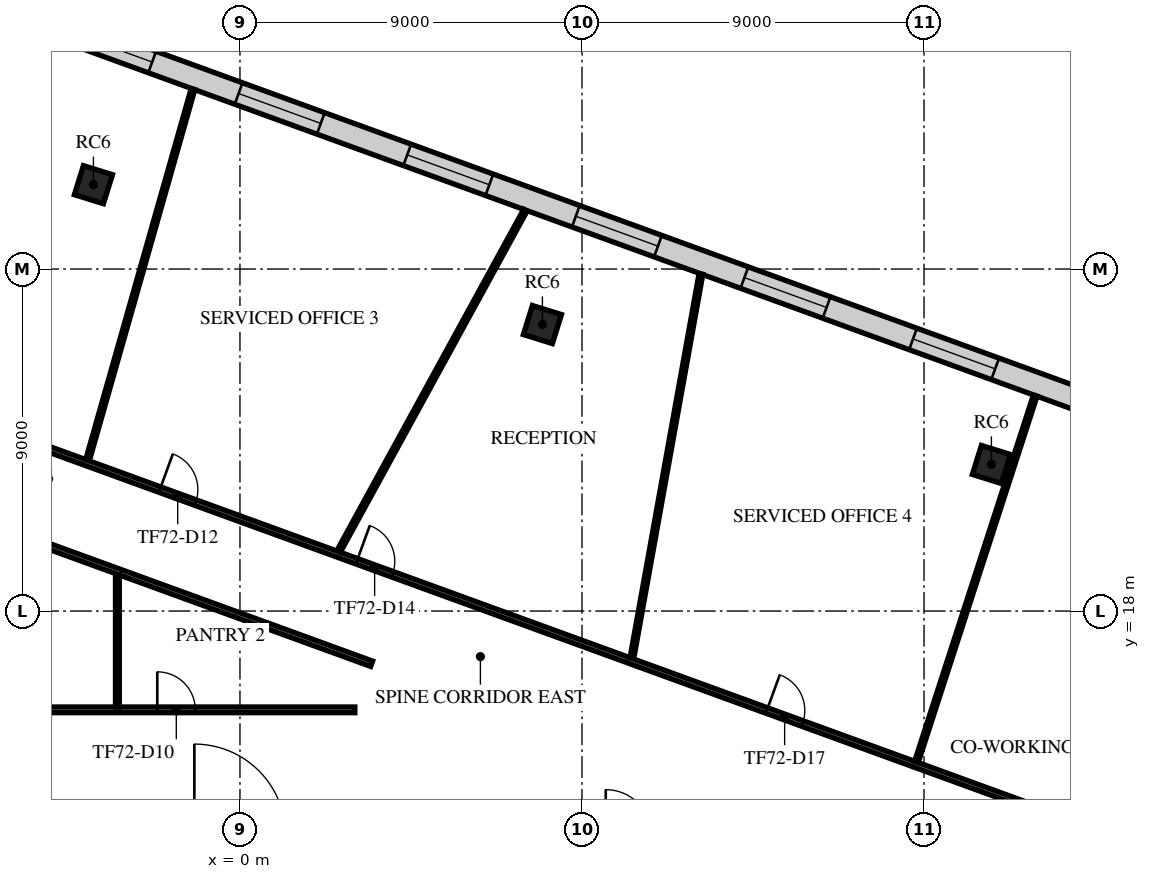
"""IFC4 building model, lengths in metres.
Left out: names, types, materials, properties, quantities, classifications, styles, units other than length and angle.
Written with IfcOpenShell. Run it as: python <this file> out.ifc"""

import sys

from ifc_helpers import new_model, si_unit, direction, frame, frame_2d, origin, origin_2d, place, context, subcontext, project, spatial, rectangle, extrude, element, fill, save


model = new_model("IFC4")
c1 = context("Model", 3, precision=1e-05, world=origin(), true_north=direction((0.0, 1.0)))
c2 = subcontext(c1, "Body", "Model", "MODEL_VIEW")
j1 = project(units=[si_unit("LENGTHUNIT", "METRE"), si_unit("PLANEANGLEUNIT", "RADIAN")], contexts=[c1])
p1 = place(None, origin())
s1 = spatial("IfcSite", under=j1, at=p1, CompositionType="ELEMENT")
p2 = place(p1, origin())
s2 = spatial("IfcBuilding", under=s1, at=p2, CompositionType="ELEMENT")
p3 = place(p2, frame((0.0, 0.0, 304.5)))
s3 = spatial("IfcBuildingStorey", under=s2, at=p3, CompositionType="ELEMENT", Elevation=304.5)
for number, where, z_axis, x_axis in (
    (1, (19.773, 21.857, 0.0), (0.0, 0.0, 1.0), (0.298, 0.955, 0.0)),
    (2, (7.958, 25.539, 0.0), (0.0, 0.0, 1.0), (0.298, 0.955, 0.0)),
    (3, (-3.856, 29.22, 0.0), (0.0, 0.0, 1.0), (0.298, 0.955, 0.0)),
):
    element("IfcColumn", number, at=place(p3, frame(where, z_axis=z_axis, x_axis=x_axis)), inside=s3, PredefinedType="COLUMN", context=c2, shape_type="SweptSolid", body=[
        extrude(rectangle(XDim=0.8, YDim=0.8, at=origin_2d()), origin(), (0.0, 0.0, 1.0), 4.0),
    ])
p4 = place(p3, frame((16.885, -31.675, 0.0), z_axis=(0.0, 0.0, 1.0), x_axis=(0.342016786282, 0.939693842643, 0.0)))
e4 = element("IfcWall", 4, at=p4, inside=s3, PredefinedType="STANDARD", context=c2, shape_type="SweptSolid", body=[
    extrude(rectangle(XDim=47.979, YDim=0.6, at=frame_2d((23.99, 0.0))), origin(), (0.0, 0.0, 1.0), 3.65),
])
p5 = place(p4, frame((1.231, 0.0, 0.9)))
e5 = element("IfcOpeningElement", 5, at=p5, cuts=e4, PredefinedType="OPENING", context=c2, shape_type="SweptSolid", body=[
    extrude(rectangle(XDim=1.9, YDim=2.1, at=frame_2d((0.95, 1.05))), frame((0.0, 0.31, 0.0), z_axis=(0.0, -1.0, 0.0), x_axis=(1.0, 0.0, 0.0)), (0.0, 0.0, 1.0), 0.62),
])
p6 = place(p4, frame((5.593, 0.0, 0.9)))
e6 = element("IfcOpeningElement", 6, at=p6, cuts=e4, PredefinedType="OPENING", context=c2, shape_type="SweptSolid", body=[
    extrude(rectangle(XDim=1.9, YDim=2.1, at=frame_2d((0.95, 1.05))), frame((0.0, 0.31, 0.0), z_axis=(0.0, -1.0, 0.0), x_axis=(1.0, 0.0, 0.0)), (0.0, 0.0, 1.0), 0.62),
])
p7 = place(p4, frame((9.954, 0.0, 0.9)))
e7 = element("IfcOpeningElement", 7, at=p7, cuts=e4, PredefinedType="OPENING", context=c2, shape_type="SweptSolid", body=[
    extrude(rectangle(XDim=1.9, YDim=2.1, at=frame_2d((0.95, 1.05))), frame((0.0, 0.31, 0.0), z_axis=(0.0, -1.0, 0.0), x_axis=(1.0, 0.0, 0.0)), (0.0, 0.0, 1.0), 0.62),
])
p8 = place(p4, frame((14.316, 0.0, 0.9)))
e8 = element("IfcOpeningElement", 8, at=p8, cuts=e4, PredefinedType="OPENING", context=c2, shape_type="SweptSolid", body=[
    extrude(rectangle(XDim=1.9, YDim=2.1, at=frame_2d((0.95, 1.05))), frame((0.0, 0.31, 0.0), z_axis=(0.0, -1.0, 0.0), x_axis=(1.0, 0.0, 0.0)), (0.0, 0.0, 1.0), 0.62),
])
p9 = place(p4, frame((18.678, 0.0, 0.9)))
e9 = element("IfcOpeningElement", 9, at=p9, cuts=e4, PredefinedType="OPENING", context=c2, shape_type="SweptSolid", body=[
    extrude(rectangle(XDim=1.9, YDim=2.1, at=frame_2d((0.95, 1.05))), frame((0.0, 0.31, 0.0), z_axis=(0.0, -1.0, 0.0), x_axis=(1.0, 0.0, 0.0)), (0.0, 0.0, 1.0), 0.62),
])
p10 = place(p4, frame((23.04, 0.0, 0.9)))
e10 = element("IfcOpeningElement", 10, at=p10, cuts=e4, PredefinedType="OPENING", context=c2, shape_type="SweptSolid", body=[
    extrude(rectangle(XDim=1.9, YDim=2.1, at=frame_2d((0.95, 1.05))), frame((0.0, 0.31, 0.0), z_axis=(0.0, -1.0, 0.0), x_axis=(1.0, 0.0, 0.0)), (0.0, 0.0, 1.0), 0.62),
])
p11 = place(p4, frame((27.401, 0.0, 0.9)))
e11 = element("IfcOpeningElement", 11, at=p11, cuts=e4, PredefinedType="OPENING", context=c2, shape_type="SweptSolid", body=[
    extrude(rectangle(XDim=1.9, YDim=2.1, at=frame_2d((0.95, 1.05))), frame((0.0, 0.31, 0.0), z_axis=(0.0, -1.0, 0.0), x_axis=(1.0, 0.0, 0.0)), (0.0, 0.0, 1.0), 0.62),
])
p12 = place(p4, frame((31.763, 0.0, 0.9)))
e12 = element("IfcOpeningElement", 12, at=p12, cuts=e4, PredefinedType="OPENING", context=c2, shape_type="SweptSolid", body=[
    extrude(rectangle(XDim=1.9, YDim=2.1, at=frame_2d((0.95, 1.05))), frame((0.0, 0.31, 0.0), z_axis=(0.0, -1.0, 0.0), x_axis=(1.0, 0.0, 0.0)), (0.0, 0.0, 1.0), 0.62),
])
p13 = place(p4, frame((36.125, 0.0, 0.9)))
e13 = element("IfcOpeningElement", 13, at=p13, cuts=e4, PredefinedType="OPENING", context=c2, shape_type="SweptSolid", body=[
    extrude(rectangle(XDim=1.9, YDim=2.1, at=frame_2d((0.95, 1.05))), frame((0.0, 0.31, 0.0), z_axis=(0.0, -1.0, 0.0), x_axis=(1.0, 0.0, 0.0)), (0.0, 0.0, 1.0), 0.62),
])
p14 = place(p4, frame((40.487, 0.0, 0.9)))
e14 = element("IfcOpeningElement", 14, at=p14, cuts=e4, PredefinedType="OPENING", context=c2, shape_type="SweptSolid", body=[
    extrude(rectangle(XDim=1.9, YDim=2.1, at=frame_2d((0.95, 1.05))), frame((0.0, 0.31, 0.0), z_axis=(0.0, -1.0, 0.0), x_axis=(1.0, 0.0, 0.0)), (0.0, 0.0, 1.0), 0.62),
])
p15 = place(p4, frame((44.848, 0.0, 0.9)))
e15 = element("IfcOpeningElement", 15, at=p15, cuts=e4, PredefinedType="OPENING", context=c2, shape_type="SweptSolid", body=[
    extrude(rectangle(XDim=1.9, YDim=2.1, at=frame_2d((0.95, 1.05))), frame((0.0, 0.31, 0.0), z_axis=(0.0, -1.0, 0.0), x_axis=(1.0, 0.0, 0.0)), (0.0, 0.0, 1.0), 0.62),
])
p16 = place(p3, frame((29.882, 20.73, 0.0), z_axis=(0.0, 0.0, 1.0), x_axis=(-0.939693396491, 0.342018012087, 0.0)))
e16 = element("IfcWall", 16, at=p16, inside=s3, PredefinedType="STANDARD", context=c2, shape_type="SweptSolid", body=[
    extrude(rectangle(XDim=42.49, YDim=0.6, at=frame_2d((21.245, 0.0))), origin(), (0.0, 0.0, 1.0), 3.65),
])
p17 = place(p16, frame((1.21, 0.0, 0.9)))
e17 = element("IfcOpeningElement", 17, at=p17, cuts=e16, PredefinedType="OPENING", context=c2, shape_type="SweptSolid", body=[
    extrude(rectangle(XDim=2.3, YDim=2.1, at=frame_2d((1.15, 1.05))), frame((0.0, 0.31, 0.0), z_axis=(0.0, -1.0, 0.0), x_axis=(1.0, 0.0, 0.0)), (0.0, 0.0, 1.0), 0.62),
])
p18 = place(p16, frame((5.932, 0.0, 0.9)))
e18 = element("IfcOpeningElement", 18, at=p18, cuts=e16, PredefinedType="OPENING", context=c2, shape_type="SweptSolid", body=[
    extrude(rectangle(XDim=2.3, YDim=2.1, at=frame_2d((1.15, 1.05))), frame((0.0, 0.31, 0.0), z_axis=(0.0, -1.0, 0.0), x_axis=(1.0, 0.0, 0.0)), (0.0, 0.0, 1.0), 0.62),
])
p19 = place(p16, frame((10.653, 0.0, 0.9)))
e19 = element("IfcOpeningElement", 19, at=p19, cuts=e16, PredefinedType="OPENING", context=c2, shape_type="SweptSolid", body=[
    extrude(rectangle(XDim=2.3, YDim=2.1, at=frame_2d((1.15, 1.05))), frame((0.0, 0.31, 0.0), z_axis=(0.0, -1.0, 0.0), x_axis=(1.0, 0.0, 0.0)), (0.0, 0.0, 1.0), 0.62),
])
p20 = place(p16, frame((15.374, 0.0, 0.9)))
e20 = element("IfcOpeningElement", 20, at=p20, cuts=e16, PredefinedType="OPENING", context=c2, shape_type="SweptSolid", body=[
    extrude(rectangle(XDim=2.3, YDim=2.1, at=frame_2d((1.15, 1.05))), frame((0.0, 0.31, 0.0), z_axis=(0.0, -1.0, 0.0), x_axis=(1.0, 0.0, 0.0)), (0.0, 0.0, 1.0), 0.62),
])
p21 = place(p16, frame((20.095, 0.0, 0.9)))
e21 = element("IfcOpeningElement", 21, at=p21, cuts=e16, PredefinedType="OPENING", context=c2, shape_type="SweptSolid", body=[
    extrude(rectangle(XDim=2.3, YDim=2.1, at=frame_2d((1.15, 1.05))), frame((0.0, 0.31, 0.0), z_axis=(0.0, -1.0, 0.0), x_axis=(1.0, 0.0, 0.0)), (0.0, 0.0, 1.0), 0.62),
])
p22 = place(p16, frame((24.816, 0.0, 0.9)))
e22 = element("IfcOpeningElement", 22, at=p22, cuts=e16, PredefinedType="OPENING", context=c2, shape_type="SweptSolid", body=[
    extrude(rectangle(XDim=2.3, YDim=2.1, at=frame_2d((1.15, 1.05))), frame((0.0, 0.31, 0.0), z_axis=(0.0, -1.0, 0.0), x_axis=(1.0, 0.0, 0.0)), (0.0, 0.0, 1.0), 0.62),
])
p23 = place(p16, frame((29.537, 0.0, 0.9)))
e23 = element("IfcOpeningElement", 23, at=p23, cuts=e16, PredefinedType="OPENING", context=c2, shape_type="SweptSolid", body=[
    extrude(rectangle(XDim=2.3, YDim=2.1, at=frame_2d((1.15, 1.05))), frame((0.0, 0.31, 0.0), z_axis=(0.0, -1.0, 0.0), x_axis=(1.0, 0.0, 0.0)), (0.0, 0.0, 1.0), 0.62),
])
p24 = place(p16, frame((34.258, 0.0, 0.9)))
e24 = element("IfcOpeningElement", 24, at=p24, cuts=e16, PredefinedType="OPENING", context=c2, shape_type="SweptSolid", body=[
    extrude(rectangle(XDim=2.3, YDim=2.1, at=frame_2d((1.15, 1.05))), frame((0.0, 0.31, 0.0), z_axis=(0.0, -1.0, 0.0), x_axis=(1.0, 0.0, 0.0)), (0.0, 0.0, 1.0), 0.62),
])
p25 = place(p16, frame((38.979, 0.0, 0.9)))
e25 = element("IfcOpeningElement", 25, at=p25, cuts=e16, PredefinedType="OPENING", context=c2, shape_type="SweptSolid", body=[
    extrude(rectangle(XDim=2.3, YDim=2.1, at=frame_2d((1.15, 1.05))), frame((0.0, 0.31, 0.0), z_axis=(0.0, -1.0, 0.0), x_axis=(1.0, 0.0, 0.0)), (0.0, 0.0, 1.0), 0.62),
])
p26 = place(p3, frame((-14.25, 15.4, 0.0), z_axis=(0.0, 0.0, 1.0), x_axis=(1.0, 0.0, 0.0)))
e26 = element("IfcWall", 26, at=p26, inside=s3, PredefinedType="PARTITIONING", context=c2, shape_type="SweptSolid", body=[
    extrude(rectangle(XDim=17.273, YDim=0.15, at=frame_2d((8.637, 0.0))), origin(), (0.0, 0.0, 1.0), 3.25),
])
p27 = place(p26, frame((12.075, 0.0, 0.0)))
e27 = element("IfcOpeningElement", 27, at=p27, cuts=e26, PredefinedType="OPENING", context=c2, shape_type="SweptSolid", body=[
    extrude(rectangle(XDim=1.0, YDim=2.1, at=frame_2d((0.5, 1.05))), frame((0.0, 0.085, 0.0), z_axis=(0.0, -1.0, 0.0), x_axis=(1.0, 0.0, 0.0)), (0.0, 0.0, 1.0), 0.17),
])
p28 = place(p3, frame((-12.369, 22.376, 0.0), z_axis=(0.0, 0.0, 1.0), x_axis=(0.939694397018, -0.342015263129, 0.0)))
e28 = element("IfcWall", 28, at=p28, inside=s3, PredefinedType="PARTITIONING", context=c2, shape_type="SweptSolid", body=[
    extrude(rectangle(XDim=16.851, YDim=0.15, at=frame_2d((8.425, 0.0))), origin(), (0.0, 0.0, 1.0), 3.25),
])
p29 = place(p3, frame((-11.549, 24.631, 0.0), z_axis=(0.0, 0.0, 1.0), x_axis=(0.939685979246, -0.342038390256, 0.0)))
e29 = element("IfcWall", 29, at=p29, inside=s3, PredefinedType="PARTITIONING", context=c2, shape_type="SweptSolid", body=[
    extrude(rectangle(XDim=38.628, YDim=0.15, at=frame_2d((19.314, 0.0))), origin(), (0.0, 0.0, 1.0), 3.25),
])
p30 = place(p29, frame((5.05, 0.0, 0.0)))
e30 = element("IfcOpeningElement", 30, at=p30, cuts=e29, PredefinedType="OPENING", context=c2, shape_type="SweptSolid", body=[
    extrude(rectangle(XDim=1.8, YDim=2.1, at=frame_2d((0.9, 1.05))), frame((0.0, 0.085, 0.0), z_axis=(0.0, -1.0, 0.0), x_axis=(1.0, 0.0, 0.0)), (0.0, 0.0, 1.0), 0.17),
])
p31 = place(p29, frame((10.046, 0.0, 0.0)))
e31 = element("IfcOpeningElement", 31, at=p31, cuts=e29, PredefinedType="OPENING", context=c2, shape_type="SweptSolid", body=[
    extrude(rectangle(XDim=1.0, YDim=2.1, at=frame_2d((0.5, 1.05))), frame((0.0, 0.085, 0.0), z_axis=(0.0, -1.0, 0.0), x_axis=(1.0, 0.0, 0.0)), (0.0, 0.0, 1.0), 0.17),
])
p32 = place(p29, frame((15.561, 0.0, 0.0)))
e32 = element("IfcOpeningElement", 32, at=p32, cuts=e29, PredefinedType="OPENING", context=c2, shape_type="SweptSolid", body=[
    extrude(rectangle(XDim=1.0, YDim=2.1, at=frame_2d((0.5, 1.05))), frame((0.0, 0.085, 0.0), z_axis=(0.0, -1.0, 0.0), x_axis=(1.0, 0.0, 0.0)), (0.0, 0.0, 1.0), 0.17),
])
p33 = place(p29, frame((27.042, 0.0, 0.0)))
e33 = element("IfcOpeningElement", 33, at=p33, cuts=e29, PredefinedType="OPENING", context=c2, shape_type="SweptSolid", body=[
    extrude(rectangle(XDim=1.0, YDim=2.1, at=frame_2d((0.5, 1.05))), frame((0.0, 0.085, 0.0), z_axis=(0.0, -1.0, 0.0), x_axis=(1.0, 0.0, 0.0)), (0.0, 0.0, 1.0), 0.17),
])
p34 = place(p29, frame((35.506, 0.0, 0.0)))
e34 = element("IfcOpeningElement", 34, at=p34, cuts=e29, PredefinedType="OPENING", context=c2, shape_type="SweptSolid", body=[
    extrude(rectangle(XDim=1.0, YDim=2.1, at=frame_2d((0.5, 1.05))), frame((0.0, 0.085, 0.0), z_axis=(0.0, -1.0, 0.0), x_axis=(1.0, 0.0, 0.0)), (0.0, 0.0, 1.0), 0.17),
])
p35 = place(p3, frame((-4.01, 21.971, 0.0), z_axis=(0.0, 0.0, 1.0), x_axis=(0.273351697038, 0.96191415923, 0.0)))
e35 = element("IfcWall", 35, at=p35, inside=s3, PredefinedType="PARTITIONING", context=c2, shape_type="SweptSolid", body=[
    extrude(rectangle(XDim=10.15, YDim=0.1, at=frame_2d((5.075, 0.0))), origin(), (0.0, 0.0, 1.0), 3.05),
])
p36 = place(p3, frame((-3.225, 15.475, 0.0), z_axis=(0.0, 0.0, 1.0), x_axis=(0.0, 1.0, 0.0)))
e36 = element("IfcWall", 36, at=p36, inside=s3, PredefinedType="PARTITIONING", context=c2, shape_type="SweptSolid", body=[
    extrude(rectangle(XDim=3.475, YDim=0.1, at=frame_2d((1.737, 0.0))), origin(), (0.0, 0.0, 1.0), 3.25),
])
p37 = place(p3, frame((2.597, 19.57, 0.0), z_axis=(0.0, 0.0, 1.0), x_axis=(0.480064743051, 0.877233060526, 0.0)))
e37 = element("IfcWall", 37, at=p37, inside=s3, PredefinedType="PARTITIONING", context=c2, shape_type="SweptSolid", body=[
    extrude(rectangle(XDim=10.237, YDim=0.1, at=frame_2d((5.119, 0.0))), origin(), (0.0, 0.0, 1.0), 3.05),
])
p38 = place(p3, frame((10.313, 16.762, 0.0), z_axis=(0.0, 0.0, 1.0), x_axis=(0.176922718916, 0.984224746454, 0.0)))
e38 = element("IfcWall", 38, at=p38, inside=s3, PredefinedType="PARTITIONING", context=c2, shape_type="SweptSolid", body=[
    extrude(rectangle(XDim=10.27, YDim=0.1, at=frame_2d((5.135, 0.0))), origin(), (0.0, 0.0, 1.0), 3.05),
])
p39 = place(p3, frame((17.801, 14.03, 0.0), z_axis=(0.0, 0.0, 1.0), x_axis=(0.308373882016, 0.951265235826, 0.0)))
e39 = element("IfcWall", 39, at=p39, inside=s3, PredefinedType="PARTITIONING", context=c2, shape_type="SweptSolid", body=[
    extrude(rectangle(XDim=10.132, YDim=0.1, at=frame_2d((5.066, 0.0))), origin(), (0.0, 0.0, 1.0), 3.05),
])
p40 = place(p19, origin())
e40 = element("IfcWindow", 40, at=p40, inside=s3, PartitioningType="SINGLE_PANEL", PredefinedType="WINDOW", context=c2, shape_type="SweptSolid", body=[
    extrude(rectangle(XDim=2.3, YDim=2.1, at=frame_2d((1.15, 1.05))), frame((0.0, 0.03, 0.0), z_axis=(0.0, -1.0, 0.0), x_axis=(1.0, 0.0, 0.0)), (0.0, 0.0, 1.0), 0.06),
])
fill(e19, e40)
p41 = place(p20, origin())
e41 = element("IfcWindow", 41, at=p41, inside=s3, PartitioningType="SINGLE_PANEL", PredefinedType="WINDOW", context=c2, shape_type="SweptSolid", body=[
    extrude(rectangle(XDim=2.3, YDim=2.1, at=frame_2d((1.15, 1.05))), frame((0.0, 0.03, 0.0), z_axis=(0.0, -1.0, 0.0), x_axis=(1.0, 0.0, 0.0)), (0.0, 0.0, 1.0), 0.06),
])
fill(e20, e41)
p42 = place(p21, origin())
e42 = element("IfcWindow", 42, at=p42, inside=s3, PartitioningType="SINGLE_PANEL", PredefinedType="WINDOW", context=c2, shape_type="SweptSolid", body=[
    extrude(rectangle(XDim=2.3, YDim=2.1, at=frame_2d((1.15, 1.05))), frame((0.0, 0.03, 0.0), z_axis=(0.0, -1.0, 0.0), x_axis=(1.0, 0.0, 0.0)), (0.0, 0.0, 1.0), 0.06),
])
fill(e21, e42)
p43 = place(p22, origin())
e43 = element("IfcWindow", 43, at=p43, inside=s3, PartitioningType="SINGLE_PANEL", PredefinedType="WINDOW", context=c2, shape_type="SweptSolid", body=[
    extrude(rectangle(XDim=2.3, YDim=2.1, at=frame_2d((1.15, 1.05))), frame((0.0, 0.03, 0.0), z_axis=(0.0, -1.0, 0.0), x_axis=(1.0, 0.0, 0.0)), (0.0, 0.0, 1.0), 0.06),
])
fill(e22, e43)
p44 = place(p23, origin())
e44 = element("IfcWindow", 44, at=p44, inside=s3, PartitioningType="SINGLE_PANEL", PredefinedType="WINDOW", context=c2, shape_type="SweptSolid", body=[
    extrude(rectangle(XDim=2.3, YDim=2.1, at=frame_2d((1.15, 1.05))), frame((0.0, 0.03, 0.0), z_axis=(0.0, -1.0, 0.0), x_axis=(1.0, 0.0, 0.0)), (0.0, 0.0, 1.0), 0.06),
])
fill(e23, e44)
p45 = place(p24, origin())
e45 = element("IfcWindow", 45, at=p45, inside=s3, PartitioningType="SINGLE_PANEL", PredefinedType="WINDOW", context=c2, shape_type="SweptSolid", body=[
    extrude(rectangle(XDim=2.3, YDim=2.1, at=frame_2d((1.15, 1.05))), frame((0.0, 0.03, 0.0), z_axis=(0.0, -1.0, 0.0), x_axis=(1.0, 0.0, 0.0)), (0.0, 0.0, 1.0), 0.06),
])
fill(e24, e45)
p46 = place(p27, origin())
e46 = element("IfcDoor", 46, at=p46, inside=s3, OperationType="SINGLE_SWING_RIGHT", PredefinedType="DOOR", context=c2, shape_type="SweptSolid", body=[
    extrude(rectangle(XDim=1.0, YDim=2.1, at=frame_2d((0.5, 1.05))), frame((0.0, 0.025, 0.0), z_axis=(0.0, -1.0, 0.0), x_axis=(1.0, 0.0, 0.0)), (0.0, 0.0, 1.0), 0.05),
])
fill(e27, e46)
p47 = place(p31, origin())
e47 = element("IfcDoor", 47, at=p47, inside=s3, OperationType="SINGLE_SWING_LEFT", PredefinedType="DOOR", context=c2, shape_type="SweptSolid", body=[
    extrude(rectangle(XDim=1.0, YDim=2.1, at=frame_2d((0.5, 1.05))), frame((0.0, 0.025, 0.0), z_axis=(0.0, -1.0, 0.0), x_axis=(1.0, 0.0, 0.0)), (0.0, 0.0, 1.0), 0.05),
])
fill(e31, e47)
p48 = place(p32, origin())
e48 = element("IfcDoor", 48, at=p48, inside=s3, OperationType="SINGLE_SWING_RIGHT", PredefinedType="DOOR", context=c2, shape_type="SweptSolid", body=[
    extrude(rectangle(XDim=1.0, YDim=2.1, at=frame_2d((0.5, 1.05))), frame((0.0, 0.025, 0.0), z_axis=(0.0, -1.0, 0.0), x_axis=(1.0, 0.0, 0.0)), (0.0, 0.0, 1.0), 0.05),
])
fill(e32, e48)
p49 = place(p33, origin())
e49 = element("IfcDoor", 49, at=p49, inside=s3, OperationType="SINGLE_SWING_RIGHT", PredefinedType="DOOR", context=c2, shape_type="SweptSolid", body=[
    extrude(rectangle(XDim=1.0, YDim=2.1, at=frame_2d((0.5, 1.05))), frame((0.0, 0.025, 0.0), z_axis=(0.0, -1.0, 0.0), x_axis=(1.0, 0.0, 0.0)), (0.0, 0.0, 1.0), 0.05),
])
fill(e33, e49)
save(model, sys.argv[1])
